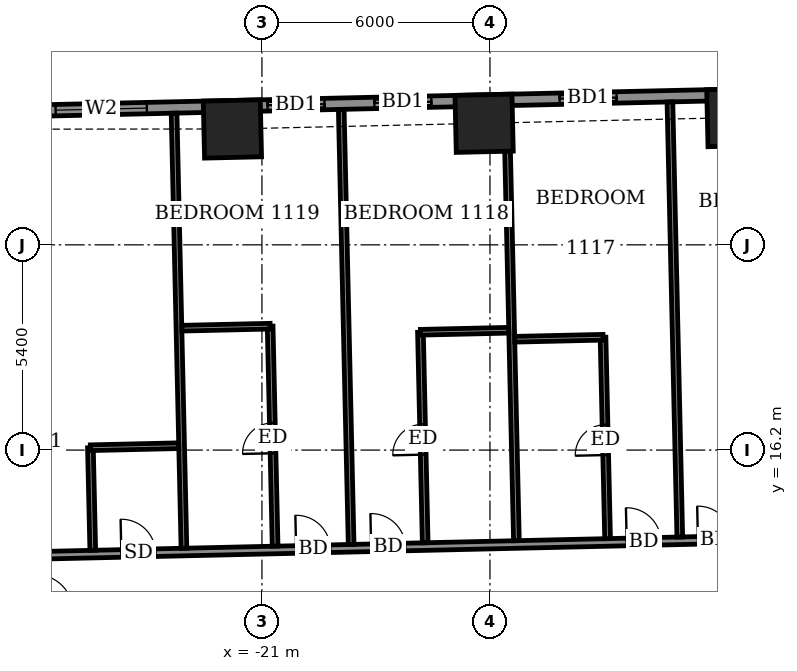
"""IFC4 building model, lengths in metres.
Left out: names, types, materials, properties, quantities, classifications, styles, units other than length and angle.
Written with IfcOpenShell. Run it as: python <this file> out.ifc"""

import sys

from ifc_helpers import new_model, si_unit, direction, frame, frame_2d, origin, origin_2d, place, context, subcontext, project, spatial, rectangle, extrude, element, fill, save


model = new_model("IFC4")
c1 = context("Model", 3, precision=1e-05, world=origin(), true_north=direction((0.0, 1.0)))
c2 = subcontext(c1, "Body", "Model", "MODEL_VIEW")
j1 = project(units=[si_unit("LENGTHUNIT", "METRE"), si_unit("PLANEANGLEUNIT", "RADIAN")], contexts=[c1])
p1 = place(None, origin())
s1 = spatial("IfcSite", under=j1, at=p1, CompositionType="ELEMENT")
p2 = place(p1, origin())
s2 = spatial("IfcBuilding", under=s1, at=p2, CompositionType="ELEMENT")
p3 = place(p2, frame((0.0, 0.0, 48.5)))
s3 = spatial("IfcBuildingStorey", under=s2, at=p3, CompositionType="ELEMENT", Elevation=48.5)
for number, where, z_axis, x_axis in (
    (1, (-8.53, 24.949, -0.55), (0.0, 0.0, 1.0), (-1.0, -0.023, 0.0)),
    (2, (-15.154, 24.799, -0.55), (0.0, 0.0, 1.0), (-1.0, -0.023, 0.0)),
    (3, (-21.777, 24.649, -0.55), (0.0, 0.0, 1.0), (-1.0, -0.023, 0.0)),
):
    element("IfcColumn", number, at=place(p3, frame(where, z_axis=z_axis, x_axis=x_axis)), inside=s3, PredefinedType="COLUMN", context=c2, shape_type="SweptSolid", body=[
        extrude(rectangle(XDim=1.5, YDim=1.5, at=origin_2d()), origin(), (0.0, 0.0, 1.0), 3.6),
    ])
p4 = place(p3, frame((24.423, 26.298, 0.0), z_axis=(0.0, 0.0, 1.0), x_axis=(-0.999742433108, -0.022695097355, 0.0)))
e4 = element("IfcWall", 4, at=p4, inside=s3, PredefinedType="SOLIDWALL", context=c2, shape_type="SweptSolid", body=[
    extrude(rectangle(XDim=52.701, YDim=0.3, at=frame_2d((26.35, 0.0))), origin(), (0.0, 0.0, 1.0), 3.05),
])
p5 = place(p4, frame((2.009, 0.0, 0.0)))
e5 = element("IfcOpeningElement", 5, at=p5, cuts=e4, PredefinedType="OPENING", context=c2, shape_type="SweptSolid", body=[
    extrude(rectangle(XDim=1.5, YDim=2.4, at=frame_2d((0.75, 1.2))), frame((0.0, 0.16, 0.0), z_axis=(0.0, -1.0, 0.0), x_axis=(1.0, 0.0, 0.0)), (0.0, 0.0, 1.0), 0.32),
])
p6 = place(p4, frame((7.337, 0.0, 0.0)))
e6 = element("IfcOpeningElement", 6, at=p6, cuts=e4, PredefinedType="OPENING", context=c2, shape_type="SweptSolid", body=[
    extrude(rectangle(XDim=1.2, YDim=2.4, at=frame_2d((0.6, 1.2))), frame((0.0, 0.16, 0.0), z_axis=(0.0, -1.0, 0.0), x_axis=(1.0, 0.0, 0.0)), (0.0, 0.0, 1.0), 0.32),
])
p7 = place(p4, frame((10.0, 0.0, 0.0)))
e7 = element("IfcOpeningElement", 7, at=p7, cuts=e4, PredefinedType="OPENING", context=c2, shape_type="SweptSolid", body=[
    extrude(rectangle(XDim=1.5, YDim=2.4, at=frame_2d((0.75, 1.2))), frame((0.0, 0.16, 0.0), z_axis=(0.0, -1.0, 0.0), x_axis=(1.0, 0.0, 0.0)), (0.0, 0.0, 1.0), 0.32),
])
p8 = place(p4, frame((14.85, 0.0, 0.0)))
e8 = element("IfcOpeningElement", 8, at=p8, cuts=e4, PredefinedType="OPENING", context=c2, shape_type="SweptSolid", body=[
    extrude(rectangle(XDim=1.5, YDim=2.4, at=frame_2d((0.75, 1.2))), frame((0.0, 0.16, 0.0), z_axis=(0.0, -1.0, 0.0), x_axis=(1.0, 0.0, 0.0)), (0.0, 0.0, 1.0), 0.32),
])
p9 = place(p4, frame((20.638, 0.0, 0.9)))
e9 = element("IfcOpeningElement", 9, at=p9, cuts=e4, PredefinedType="OPENING", context=c2, shape_type="SweptSolid", body=[
    extrude(rectangle(XDim=0.9, YDim=1.5, at=frame_2d((0.45, 0.75))), frame((0.0, 0.16, 0.0), z_axis=(0.0, -1.0, 0.0), x_axis=(1.0, 0.0, 0.0)), (0.0, 0.0, 1.0), 0.32),
])
p10 = place(p4, frame((23.125, 0.0, 0.0)))
e10 = element("IfcOpeningElement", 10, at=p10, cuts=e4, PredefinedType="OPENING", context=c2, shape_type="SweptSolid", body=[
    extrude(rectangle(XDim=1.5, YDim=2.4, at=frame_2d((0.75, 1.2))), frame((0.0, 0.16, 0.0), z_axis=(0.0, -1.0, 0.0), x_axis=(1.0, 0.0, 0.0)), (0.0, 0.0, 1.0), 0.32),
])
p11 = place(p4, frame((27.9, 0.0, 0.0)))
e11 = element("IfcOpeningElement", 11, at=p11, cuts=e4, PredefinedType="OPENING", context=c2, shape_type="SweptSolid", body=[
    extrude(rectangle(XDim=1.5, YDim=2.4, at=frame_2d((0.75, 1.2))), frame((0.0, 0.16, 0.0), z_axis=(0.0, -1.0, 0.0), x_axis=(1.0, 0.0, 0.0)), (0.0, 0.0, 1.0), 0.32),
])
p12 = place(p4, frame((30.862, 0.0, 0.0)))
e12 = element("IfcOpeningElement", 12, at=p12, cuts=e4, PredefinedType="OPENING", context=c2, shape_type="SweptSolid", body=[
    extrude(rectangle(XDim=1.2, YDim=2.4, at=frame_2d((0.6, 1.2))), frame((0.0, 0.16, 0.0), z_axis=(0.0, -1.0, 0.0), x_axis=(1.0, 0.0, 0.0)), (0.0, 0.0, 1.0), 0.32),
])
p13 = place(p4, frame((36.1, 0.0, 0.0)))
e13 = element("IfcOpeningElement", 13, at=p13, cuts=e4, PredefinedType="OPENING", context=c2, shape_type="SweptSolid", body=[
    extrude(rectangle(XDim=1.5, YDim=2.4, at=frame_2d((0.75, 1.2))), frame((0.0, 0.16, 0.0), z_axis=(0.0, -1.0, 0.0), x_axis=(1.0, 0.0, 0.0)), (0.0, 0.0, 1.0), 0.32),
])
p14 = place(p4, frame((40.975, 0.0, 0.0)))
e14 = element("IfcOpeningElement", 14, at=p14, cuts=e4, PredefinedType="OPENING", context=c2, shape_type="SweptSolid", body=[
    extrude(rectangle(XDim=1.5, YDim=2.4, at=frame_2d((0.75, 1.2))), frame((0.0, 0.16, 0.0), z_axis=(0.0, -1.0, 0.0), x_axis=(1.0, 0.0, 0.0)), (0.0, 0.0, 1.0), 0.32),
])
p15 = place(p4, frame((43.788, 0.0, 0.0)))
e15 = element("IfcOpeningElement", 15, at=p15, cuts=e4, PredefinedType="OPENING", context=c2, shape_type="SweptSolid", body=[
    extrude(rectangle(XDim=1.5, YDim=2.4, at=frame_2d((0.75, 1.2))), frame((0.0, 0.16, 0.0), z_axis=(0.0, -1.0, 0.0), x_axis=(1.0, 0.0, 0.0)), (0.0, 0.0, 1.0), 0.32),
])
p16 = place(p4, frame((48.464, 0.0, 0.9)))
e16 = element("IfcOpeningElement", 16, at=p16, cuts=e4, PredefinedType="OPENING", context=c2, shape_type="SweptSolid", body=[
    extrude(rectangle(XDim=2.4, YDim=1.5, at=frame_2d((1.2, 0.75))), frame((0.0, 0.16, 0.0), z_axis=(0.0, -1.0, 0.0), x_axis=(1.0, 0.0, 0.0)), (0.0, 0.0, 1.0), 0.32),
])
p17 = place(p3, frame((-28.446, 26.548, 0.0), z_axis=(0.0, 0.0, 1.0), x_axis=(0.999743608889, 0.022643243723, 0.0)))
e17 = element("IfcWall", 17, at=p17, inside=s3, PredefinedType="USERDEFINED", context=c2, shape_type="SweptSolid", body=[
    extrude(rectangle(XDim=2.199, YDim=0.55, at=frame_2d((1.1, 0.0))), origin(), (0.0, 0.0, 1.0), 0.8),
])
p18 = place(p3, frame((-12.25, 26.915, 0.0), z_axis=(0.0, 0.0, 1.0), x_axis=(0.999743094499, 0.022665943652, 0.0)))
e18 = element("IfcWall", 18, at=p18, inside=s3, PredefinedType="USERDEFINED", context=c2, shape_type="SweptSolid", body=[
    extrude(rectangle(XDim=6.0, YDim=0.55, at=frame_2d((3.0, 0.0))), origin(), (0.0, 0.0, 1.0), 0.8),
])
p19 = place(p3, frame((-31.347, 13.329, 0.0), z_axis=(0.0, 0.0, 1.0), x_axis=(0.999742613079, 0.022687168058, 0.0)))
e19 = element("IfcWall", 19, at=p19, inside=s3, PredefinedType="PARTITIONING", context=c2, shape_type="SweptSolid", body=[
    extrude(rectangle(XDim=58.799, YDim=0.2, at=frame_2d((29.399, 0.0))), origin(), (0.0, 0.0, 1.0), 3.05),
])
p20 = place(p19, frame((56.675, 0.0, 0.0)))
e20 = element("IfcOpeningElement", 20, at=p20, cuts=e19, PredefinedType="OPENING", context=c2, shape_type="SweptSolid", body=[
    extrude(rectangle(XDim=1.0, YDim=2.1, at=frame_2d((0.5, 1.05))), frame((0.0, 0.11, 0.0), z_axis=(0.0, -1.0, 0.0), x_axis=(1.0, 0.0, 0.0)), (0.0, 0.0, 1.0), 0.22),
])
p21 = place(p19, frame((52.4, 0.0, 0.0)))
e21 = element("IfcOpeningElement", 21, at=p21, cuts=e19, PredefinedType="OPENING", context=c2, shape_type="SweptSolid", body=[
    extrude(rectangle(XDim=0.9, YDim=2.1, at=frame_2d((0.45, 1.05))), frame((0.0, 0.11, 0.0), z_axis=(0.0, -1.0, 0.0), x_axis=(1.0, 0.0, 0.0)), (0.0, 0.0, 1.0), 0.22),
])
p22 = place(p19, frame((47.7, 0.0, 0.0)))
e22 = element("IfcOpeningElement", 22, at=p22, cuts=e19, PredefinedType="OPENING", context=c2, shape_type="SweptSolid", body=[
    extrude(rectangle(XDim=0.9, YDim=2.1, at=frame_2d((0.45, 1.05))), frame((0.0, 0.11, 0.0), z_axis=(0.0, -1.0, 0.0), x_axis=(1.0, 0.0, 0.0)), (0.0, 0.0, 1.0), 0.22),
])
p23 = place(p19, frame((45.7, 0.0, 0.0)))
e23 = element("IfcOpeningElement", 23, at=p23, cuts=e19, PredefinedType="OPENING", context=c2, shape_type="SweptSolid", body=[
    extrude(rectangle(XDim=0.9, YDim=2.1, at=frame_2d((0.45, 1.05))), frame((0.0, 0.11, 0.0), z_axis=(0.0, -1.0, 0.0), x_axis=(1.0, 0.0, 0.0)), (0.0, 0.0, 1.0), 0.22),
])
p24 = place(p19, frame((38.95, 0.0, 0.0)))
e24 = element("IfcOpeningElement", 24, at=p24, cuts=e19, PredefinedType="OPENING", context=c2, shape_type="SweptSolid", body=[
    extrude(rectangle(XDim=0.9, YDim=2.1, at=frame_2d((0.45, 1.05))), frame((0.0, 0.11, 0.0), z_axis=(0.0, -1.0, 0.0), x_axis=(1.0, 0.0, 0.0)), (0.0, 0.0, 1.0), 0.22),
])
p25 = place(p19, frame((37.05, 0.0, 0.0)))
e25 = element("IfcOpeningElement", 25, at=p25, cuts=e19, PredefinedType="OPENING", context=c2, shape_type="SweptSolid", body=[
    extrude(rectangle(XDim=0.9, YDim=2.1, at=frame_2d((0.45, 1.05))), frame((0.0, 0.11, 0.0), z_axis=(0.0, -1.0, 0.0), x_axis=(1.0, 0.0, 0.0)), (0.0, 0.0, 1.0), 0.22),
])
p26 = place(p19, frame((30.375, 0.0, 0.0)))
e26 = element("IfcOpeningElement", 26, at=p26, cuts=e19, PredefinedType="OPENING", context=c2, shape_type="SweptSolid", body=[
    extrude(rectangle(XDim=0.9, YDim=2.1, at=frame_2d((0.45, 1.05))), frame((0.0, 0.11, 0.0), z_axis=(0.0, -1.0, 0.0), x_axis=(1.0, 0.0, 0.0)), (0.0, 0.0, 1.0), 0.22),
])
p27 = place(p19, frame((28.5, 0.0, 0.0)))
e27 = element("IfcOpeningElement", 27, at=p27, cuts=e19, PredefinedType="OPENING", context=c2, shape_type="SweptSolid", body=[
    extrude(rectangle(XDim=0.9, YDim=2.1, at=frame_2d((0.45, 1.05))), frame((0.0, 0.11, 0.0), z_axis=(0.0, -1.0, 0.0), x_axis=(1.0, 0.0, 0.0)), (0.0, 0.0, 1.0), 0.22),
])
p28 = place(p19, frame((21.825, 0.0, 0.0)))
e28 = element("IfcOpeningElement", 28, at=p28, cuts=e19, PredefinedType="OPENING", context=c2, shape_type="SweptSolid", body=[
    extrude(rectangle(XDim=0.9, YDim=2.1, at=frame_2d((0.45, 1.05))), frame((0.0, 0.11, 0.0), z_axis=(0.0, -1.0, 0.0), x_axis=(1.0, 0.0, 0.0)), (0.0, 0.0, 1.0), 0.22),
])
p29 = place(p19, frame((19.95, 0.0, 0.0)))
e29 = element("IfcOpeningElement", 29, at=p29, cuts=e19, PredefinedType="OPENING", context=c2, shape_type="SweptSolid", body=[
    extrude(rectangle(XDim=0.9, YDim=2.1, at=frame_2d((0.45, 1.05))), frame((0.0, 0.11, 0.0), z_axis=(0.0, -1.0, 0.0), x_axis=(1.0, 0.0, 0.0)), (0.0, 0.0, 1.0), 0.22),
])
p30 = place(p19, frame((13.225, 0.0, 0.0)))
e30 = element("IfcOpeningElement", 30, at=p30, cuts=e19, PredefinedType="OPENING", context=c2, shape_type="SweptSolid", body=[
    extrude(rectangle(XDim=0.9, YDim=2.1, at=frame_2d((0.45, 1.05))), frame((0.0, 0.11, 0.0), z_axis=(0.0, -1.0, 0.0), x_axis=(1.0, 0.0, 0.0)), (0.0, 0.0, 1.0), 0.22),
])
p31 = place(p19, frame((11.25, 0.0, 0.0)))
e31 = element("IfcOpeningElement", 31, at=p31, cuts=e19, PredefinedType="OPENING", context=c2, shape_type="SweptSolid", body=[
    extrude(rectangle(XDim=0.9, YDim=2.1, at=frame_2d((0.45, 1.05))), frame((0.0, 0.11, 0.0), z_axis=(0.0, -1.0, 0.0), x_axis=(1.0, 0.0, 0.0)), (0.0, 0.0, 1.0), 0.22),
])
p32 = place(p19, frame((1.75, 0.0, 0.0)))
e32 = element("IfcOpeningElement", 32, at=p32, cuts=e19, PredefinedType="OPENING", context=c2, shape_type="SweptSolid", body=[
    extrude(rectangle(XDim=1.0, YDim=2.1, at=frame_2d((0.5, 1.05))), frame((0.0, 0.11, 0.0), z_axis=(0.0, -1.0, 0.0), x_axis=(1.0, 0.0, 0.0)), (0.0, 0.0, 1.0), 0.22),
])
p33 = place(p19, frame((6.65, 0.0, 0.0)))
e33 = element("IfcOpeningElement", 33, at=p33, cuts=e19, PredefinedType="OPENING", context=c2, shape_type="SweptSolid", body=[
    extrude(rectangle(XDim=0.9, YDim=2.1, at=frame_2d((0.45, 1.05))), frame((0.0, 0.11, 0.0), z_axis=(0.0, -1.0, 0.0), x_axis=(1.0, 0.0, 0.0)), (0.0, 0.0, 1.0), 0.22),
])
p34 = place(p3, frame((-25.451, 13.563, 0.0), z_axis=(0.0, 0.0, 1.0), x_axis=(-0.022969966847, 0.999736155505, 0.0)))
e34 = element("IfcWall", 34, at=p34, inside=s3, PredefinedType="PARTITIONING", context=c2, shape_type="SweptSolid", body=[
    extrude(rectangle(XDim=2.7, YDim=0.15, at=frame_2d((1.35, 0.0))), origin(), (0.0, 0.0, 1.0), 3.05),
])
p35 = place(p3, frame((-23.052, 13.617, 0.0), z_axis=(0.0, 0.0, 1.0), x_axis=(-0.022708327922, 0.999742132674, 0.0)))
e35 = element("IfcWall", 35, at=p35, inside=s3, PredefinedType="PARTITIONING", context=c2, shape_type="SweptSolid", body=[
    extrude(rectangle(XDim=11.45, YDim=0.15, at=frame_2d((5.725, 0.0))), origin(), (0.0, 0.0, 1.0), 2.55),
])
p36 = place(p3, frame((-20.653, 13.672, 0.0), z_axis=(0.0, 0.0, 1.0), x_axis=(-0.022603579342, 0.999744506462, 0.0)))
e36 = element("IfcWall", 36, at=p36, inside=s3, PredefinedType="PARTITIONING", context=c2, shape_type="SweptSolid", body=[
    extrude(rectangle(XDim=5.789, YDim=0.15, at=frame_2d((2.895, 0.0))), origin(), (0.0, 0.0, 1.0), 3.05),
])
p37 = place(p36, frame((2.445, 0.0, 0.0)))
e37 = element("IfcOpeningElement", 37, at=p37, cuts=e36, PredefinedType="OPENING", context=c2, shape_type="SweptSolid", body=[
    extrude(rectangle(XDim=0.8, YDim=2.1, at=frame_2d((0.4, 1.05))), frame((0.0, 0.085, 0.0), z_axis=(0.0, -1.0, 0.0), x_axis=(1.0, 0.0, 0.0)), (0.0, 0.0, 1.0), 0.17),
])
p38 = place(p3, frame((-18.653, 13.717, 0.0), z_axis=(0.0, 0.0, 1.0), x_axis=(-0.022708327922, 0.999742132674, 0.0)))
e38 = element("IfcWall", 38, at=p38, inside=s3, PredefinedType="PARTITIONING", context=c2, shape_type="SweptSolid", body=[
    extrude(rectangle(XDim=11.45, YDim=0.15, at=frame_2d((5.725, 0.0))), origin(), (0.0, 0.0, 1.0), 2.55),
])
p39 = place(p3, frame((-16.704, 13.761, 0.0), z_axis=(0.0, 0.0, 1.0), x_axis=(-0.022561251624, 0.999745462568, 0.0)))
e39 = element("IfcWall", 39, at=p39, inside=s3, PredefinedType="PARTITIONING", context=c2, shape_type="SweptSolid", body=[
    extrude(rectangle(XDim=5.541, YDim=0.15, at=frame_2d((2.77, 0.0))), origin(), (0.0, 0.0, 1.0), 3.05),
])
p40 = place(p39, frame((2.32, 0.0, 0.0)))
e40 = element("IfcOpeningElement", 40, at=p40, cuts=e39, PredefinedType="OPENING", context=c2, shape_type="SweptSolid", body=[
    extrude(rectangle(XDim=0.8, YDim=2.1, at=frame_2d((0.4, 1.05))), frame((0.0, 0.085, 0.0), z_axis=(0.0, -1.0, 0.0), x_axis=(1.0, 0.0, 0.0)), (0.0, 0.0, 1.0), 0.17),
])
p41 = place(p3, frame((-14.304, 13.816, 0.0), z_axis=(0.0, 0.0, 1.0), x_axis=(-0.022708327922, 0.999742132674, 0.0)))
e41 = element("IfcWall", 41, at=p41, inside=s3, PredefinedType="PARTITIONING", context=c2, shape_type="SweptSolid", body=[
    extrude(rectangle(XDim=11.45, YDim=0.15, at=frame_2d((5.725, 0.0))), origin(), (0.0, 0.0, 1.0), 3.05),
])
p42 = place(p3, frame((-11.905, 13.87, 0.0), z_axis=(0.0, 0.0, 1.0), x_axis=(-0.022616771387, 0.999744208111, 0.0)))
e42 = element("IfcWall", 42, at=p42, inside=s3, PredefinedType="PARTITIONING", context=c2, shape_type="SweptSolid", body=[
    extrude(rectangle(XDim=5.3, YDim=0.15, at=frame_2d((2.65, 0.0))), origin(), (0.0, 0.0, 1.0), 3.05),
])
p43 = place(p42, frame((2.2, 0.0, 0.0)))
e43 = element("IfcOpeningElement", 43, at=p43, cuts=e42, PredefinedType="OPENING", context=c2, shape_type="SweptSolid", body=[
    extrude(rectangle(XDim=0.8, YDim=2.1, at=frame_2d((0.4, 1.05))), frame((0.0, 0.085, 0.0), z_axis=(0.0, -1.0, 0.0), x_axis=(1.0, 0.0, 0.0)), (0.0, 0.0, 1.0), 0.17),
])
p44 = place(p3, frame((-10.005, 13.913, 0.0), z_axis=(0.0, 0.0, 1.0), x_axis=(-0.022706391805, 0.999742176649, 0.0)))
e44 = element("IfcWall", 44, at=p44, inside=s3, PredefinedType="PARTITIONING", context=c2, shape_type="SweptSolid", body=[
    extrude(rectangle(XDim=11.451, YDim=0.15, at=frame_2d((5.726, 0.0))), origin(), (0.0, 0.0, 1.0), 2.55),
])
p45 = place(p3, frame((-25.513, 16.262, 0.0), z_axis=(0.0, 0.0, 1.0), x_axis=(0.999740478815, 0.022781023197, 0.0)))
e45 = element("IfcWall", 45, at=p45, inside=s3, PredefinedType="PARTITIONING", context=c2, shape_type="SweptSolid", body=[
    extrude(rectangle(XDim=2.325, YDim=0.15, at=frame_2d((1.163, 0.0))), origin(), (0.0, 0.0, 1.0), 3.05),
])
for number, where, z_axis, x_axis in (
    (46, (-14.349, 19.116, 0.0), (0.0, 0.0, 1.0), (1.0, 0.023, 0.0)),
    (47, (-16.829, 19.3, 0.0), (0.0, 0.0, 1.0), (1.0, 0.023, 0.0)),
):
    element("IfcWall", number, at=place(p3, frame(where, z_axis=z_axis, x_axis=x_axis)), inside=s3, PredefinedType="PARTITIONING", context=c2, shape_type="SweptSolid", body=[
        extrude(rectangle(XDim=2.325, YDim=0.15, at=frame_2d((1.162, 0.0))), origin(), (0.0, 0.0, 1.0), 3.05),
    ])
p46 = place(p3, frame((-23.108, 19.407, 0.0), z_axis=(0.0, 0.0, 1.0), x_axis=(0.999740260747, 0.02279059109, 0.0)))
e48 = element("IfcWall", 48, at=p46, inside=s3, PredefinedType="PARTITIONING", context=c2, shape_type="SweptSolid", body=[
    extrude(rectangle(XDim=2.324, YDim=0.15, at=frame_2d((1.162, 0.0))), origin(), (0.0, 0.0, 1.0), 3.05),
])
p47 = place(p13, origin())
e49 = element("IfcDoor", 49, at=p47, inside=s3, OperationType="SLIDING_TO_LEFT", PredefinedType="DOOR", context=c2, shape_type="SweptSolid", body=[
    extrude(rectangle(XDim=1.5, YDim=2.4, at=frame_2d((0.75, 1.2))), frame((0.0, 0.025, 0.0), z_axis=(0.0, -1.0, 0.0), x_axis=(1.0, 0.0, 0.0)), (0.0, 0.0, 1.0), 0.05),
])
fill(e13, e49)
p48 = place(p14, origin())
e50 = element("IfcDoor", 50, at=p48, inside=s3, OperationType="SLIDING_TO_LEFT", PredefinedType="DOOR", context=c2, shape_type="SweptSolid", body=[
    extrude(rectangle(XDim=1.5, YDim=2.4, at=frame_2d((0.75, 1.2))), frame((0.0, 0.025, 0.0), z_axis=(0.0, -1.0, 0.0), x_axis=(1.0, 0.0, 0.0)), (0.0, 0.0, 1.0), 0.05),
])
fill(e14, e50)
p49 = place(p15, origin())
e51 = element("IfcDoor", 51, at=p49, inside=s3, OperationType="SLIDING_TO_LEFT", PredefinedType="DOOR", context=c2, shape_type="SweptSolid", body=[
    extrude(rectangle(XDim=1.5, YDim=2.4, at=frame_2d((0.75, 1.2))), frame((0.0, 0.025, 0.0), z_axis=(0.0, -1.0, 0.0), x_axis=(1.0, 0.0, 0.0)), (0.0, 0.0, 1.0), 0.05),
])
fill(e15, e51)
p50 = place(p16, origin())
e52 = element("IfcWindow", 52, at=p50, inside=s3, PartitioningType="DOUBLE_PANEL_VERTICAL", PredefinedType="WINDOW", context=c2, shape_type="SweptSolid", body=[
    extrude(rectangle(XDim=2.4, YDim=1.5, at=frame_2d((1.2, 0.75))), frame((0.0, 0.03, 0.0), z_axis=(0.0, -1.0, 0.0), x_axis=(1.0, 0.0, 0.0)), (0.0, 0.0, 1.0), 0.06),
])
fill(e16, e52)
p51 = place(p28, origin())
e53 = element("IfcDoor", 53, at=p51, inside=s3, OperationType="SINGLE_SWING_RIGHT", PredefinedType="DOOR", context=c2, shape_type="SweptSolid", body=[
    extrude(rectangle(XDim=0.9, YDim=2.1, at=frame_2d((0.45, 1.05))), frame((0.0, 0.025, 0.0), z_axis=(0.0, -1.0, 0.0), x_axis=(1.0, 0.0, 0.0)), (0.0, 0.0, 1.0), 0.05),
])
fill(e28, e53)
p52 = place(p29, origin())
e54 = element("IfcDoor", 54, at=p52, inside=s3, OperationType="SINGLE_SWING_LEFT", PredefinedType="DOOR", context=c2, shape_type="SweptSolid", body=[
    extrude(rectangle(XDim=0.9, YDim=2.1, at=frame_2d((0.45, 1.05))), frame((0.0, 0.025, 0.0), z_axis=(0.0, -1.0, 0.0), x_axis=(1.0, 0.0, 0.0)), (0.0, 0.0, 1.0), 0.05),
])
fill(e29, e54)
p53 = place(p43, origin())
e55 = element("IfcDoor", 55, at=p53, inside=s3, OperationType="SINGLE_SWING_LEFT", PredefinedType="DOOR", context=c2, shape_type="SweptSolid", body=[
    extrude(rectangle(XDim=0.8, YDim=2.1, at=frame_2d((0.4, 1.05))), frame((0.0, 0.025, 0.0), z_axis=(0.0, -1.0, 0.0), x_axis=(1.0, 0.0, 0.0)), (0.0, 0.0, 1.0), 0.05),
])
fill(e43, e55)
p54 = place(p30, origin())
e56 = element("IfcDoor", 56, at=p54, inside=s3, OperationType="SINGLE_SWING_RIGHT", PredefinedType="DOOR", context=c2, shape_type="SweptSolid", body=[
    extrude(rectangle(XDim=0.9, YDim=2.1, at=frame_2d((0.45, 1.05))), frame((0.0, 0.025, 0.0), z_axis=(0.0, -1.0, 0.0), x_axis=(1.0, 0.0, 0.0)), (0.0, 0.0, 1.0), 0.05),
])
fill(e30, e56)
p55 = place(p40, origin())
e57 = element("IfcDoor", 57, at=p55, inside=s3, OperationType="SINGLE_SWING_RIGHT", PredefinedType="DOOR", context=c2, shape_type="SweptSolid", body=[
    extrude(rectangle(XDim=0.8, YDim=2.1, at=frame_2d((0.4, 1.05))), frame((0.0, 0.025, 0.0), z_axis=(0.0, -1.0, 0.0), x_axis=(1.0, 0.0, 0.0)), (0.0, 0.0, 1.0), 0.05),
])
fill(e40, e57)
p56 = place(p31, origin())
e58 = element("IfcDoor", 58, at=p56, inside=s3, OperationType="SINGLE_SWING_LEFT", PredefinedType="DOOR", context=c2, shape_type="SweptSolid", body=[
    extrude(rectangle(XDim=0.9, YDim=2.1, at=frame_2d((0.45, 1.05))), frame((0.0, 0.025, 0.0), z_axis=(0.0, -1.0, 0.0), x_axis=(1.0, 0.0, 0.0)), (0.0, 0.0, 1.0), 0.05),
])
fill(e31, e58)
p57 = place(p37, origin())
e59 = element("IfcDoor", 59, at=p57, inside=s3, OperationType="SINGLE_SWING_LEFT", PredefinedType="DOOR", context=c2, shape_type="SweptSolid", body=[
    extrude(rectangle(XDim=0.8, YDim=2.1, at=frame_2d((0.4, 1.05))), frame((0.0, 0.025, 0.0), z_axis=(0.0, -1.0, 0.0), x_axis=(1.0, 0.0, 0.0)), (0.0, 0.0, 1.0), 0.05),
])
fill(e37, e59)
p58 = place(p33, origin())
e60 = element("IfcDoor", 60, at=p58, inside=s3, OperationType="SINGLE_SWING_LEFT", PredefinedType="DOOR", context=c2, shape_type="SweptSolid", body=[
    extrude(rectangle(XDim=0.9, YDim=2.1, at=frame_2d((0.45, 1.05))), frame((0.0, 0.025, 0.0), z_axis=(0.0, -1.0, 0.0), x_axis=(1.0, 0.0, 0.0)), (0.0, 0.0, 1.0), 0.05),
])
fill(e33, e60)
save(model, sys.argv[1])
